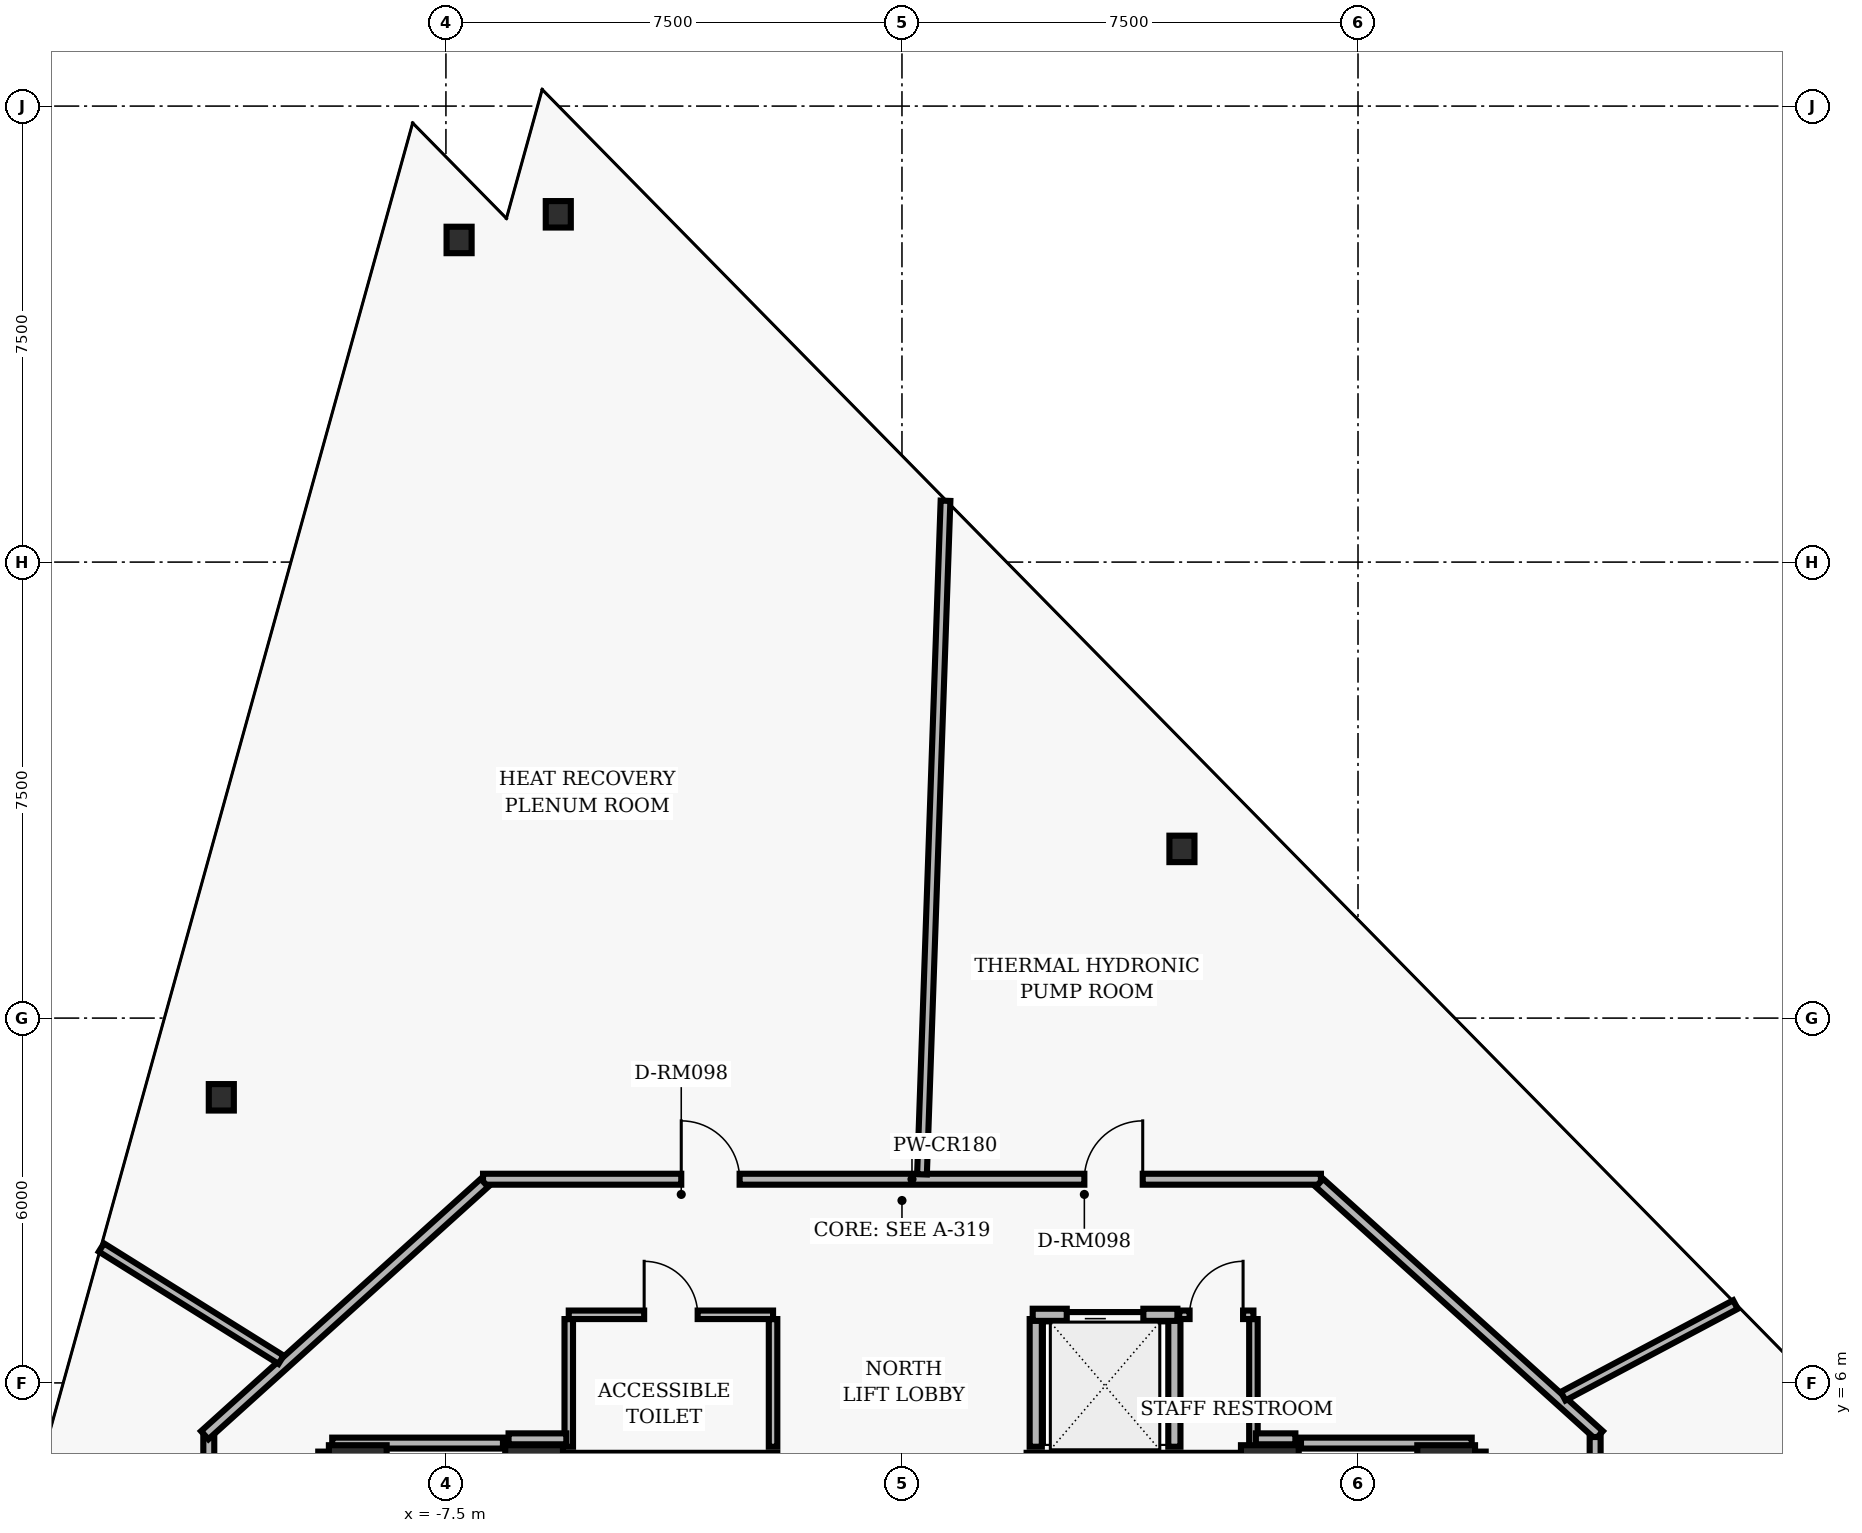
"""IFC4 building model, lengths in metres.
Left out: names, types, materials, properties, quantities, classifications, styles, units other than length and angle.
Written with IfcOpenShell. Run it as: python <this file> out.ifc"""

import sys

from ifc_helpers import new_model, si_unit, direction, frame, frame_2d, origin, origin_2d, place, context, subcontext, project, spatial, rectangle, hollow_rectangle, i_section, extrude, element, fill, save


model = new_model("IFC4")
c1 = context("Model", 3, precision=1e-05, world=origin(), true_north=direction((0.0, 1.0)))
c2 = subcontext(c1, "Body", "Model", "MODEL_VIEW")
j1 = project(units=[si_unit("LENGTHUNIT", "METRE"), si_unit("PLANEANGLEUNIT", "RADIAN")], contexts=[c1])
p1 = place(None, origin())
s1 = spatial("IfcSite", under=j1, at=p1, CompositionType="ELEMENT")
p2 = place(p1, origin())
s2 = spatial("IfcBuilding", under=s1, at=p2, CompositionType="ELEMENT")
p3 = place(p2, frame((0.0, 0.0, 100.8)))
s3 = spatial("IfcBuildingStorey", under=s2, at=p3, CompositionType="ELEMENT", Elevation=100.8)
for number, where, z_axis, x_axis in (
    (1, (-6.05, 4.5, 0.0), (0.0, 0.0, 1.0), (1.0, 0.0, 0.0)),
    (2, (6.05, 4.5, 0.0), (0.0, 0.0, 1.0), (1.0, 0.0, 0.0)),
    (3, (-8.95, 4.5, 0.0), (0.0, 0.0, 1.0), (1.0, 0.0, 0.0)),
    (4, (8.95, 4.5, 0.0), (0.0, 0.0, 1.0), (1.0, 0.0, 0.0)),
):
    element("IfcColumn", number, at=place(p3, frame(where, z_axis=z_axis, x_axis=x_axis)), inside=s3, PredefinedType="COLUMN", context=c2, shape_type="SweptSolid", body=[
        extrude(hollow_rectangle(XDim=0.95, YDim=0.95, WallThickness=0.06, InnerFilletRadius=0.02, OuterFilletRadius=0.04, at=origin_2d()), origin(), (0.0, 0.0, 1.0), 3.84),
    ])
for number, where, z_axis, x_axis in (
    (5, (-5.575, 4.5, 0.0), (0.0, 0.0, 1.0), (1.0, 0.0, 0.0)),
    (6, (2.05, 4.5, 0.0), (0.0, 0.0, 1.0), (1.0, 0.0, 0.0)),
):
    element("IfcWall", number, at=place(p3, frame(where, z_axis=z_axis, x_axis=x_axis)), inside=s3, PredefinedType="SHEAR", context=c2, shape_type="SweptSolid", body=[
        extrude(rectangle(XDim=3.525, YDim=0.7, at=frame_2d((1.762, 0.0))), origin(), (0.0, 0.0, 1.0), 3.418),
    ])
for number, where, z_axis, x_axis in (
    (7, (4.604, 14.783, 0.0), (0.0, 0.0, 1.0), (1.0, 0.0, 0.0)),
    (8, (-5.652, 25.22, 0.0), (0.0, 0.0, 1.0), (1.0, 0.0, 0.0)),
    (9, (-7.283, 24.798, 0.0), (0.0, 0.0, 1.0), (1.0, 0.0, 0.0)),
    (10, (-11.194, 10.697, 0.0), (0.0, 0.0, 1.0), (1.0, 0.0, 0.0)),
):
    element("IfcColumn", number, at=place(p3, frame(where, z_axis=z_axis, x_axis=x_axis)), inside=s3, PredefinedType="COLUMN", context=c2, shape_type="SweptSolid", body=[
        extrude(i_section(OverallWidth=0.412, OverallDepth=0.435, WebThickness=0.036, FlangeThickness=0.057, FilletRadius=0.022, at=origin_2d()), origin(), (0.0, 0.0, 1.0), 3.84),
    ])
for number, where, z_axis, x_axis in (
    (11, (2.2, 4.95, 0.0), (0.0, 0.0, 1.0), (0.0, 1.0, 0.0)),
    (12, (4.48, 4.95, 0.0), (0.0, 0.0, 1.0), (0.0, 1.0, 0.0)),
):
    element("IfcWall", number, at=place(p3, frame(where, z_axis=z_axis, x_axis=x_axis)), inside=s3, PredefinedType="PARTITIONING", context=c2, shape_type="SweptSolid", body=[
        extrude(rectangle(XDim=2.1, YDim=0.2, at=frame_2d((1.05, 0.0))), origin(), (0.0, 0.0, 1.0), 3.393),
    ])
p4 = place(p3, frame((2.15, 7.12, 0.0), z_axis=(0.0, 0.0, 1.0), x_axis=(1.0, 0.0, 0.0)))
e13 = element("IfcWall", 13, at=p4, inside=s3, PredefinedType="PARTITIONING", context=c2, shape_type="SweptSolid", body=[
    extrude(rectangle(XDim=2.38, YDim=0.2, at=frame_2d((1.19, 0.0))), origin(), (0.0, 0.0, 1.0), 3.393),
])
p5 = place(p4, frame((0.56, 0.0, 0.0)))
e14 = element("IfcOpeningElement", 14, at=p5, cuts=e13, PredefinedType="OPENING", context=c2, shape_type="SweptSolid", body=[
    extrude(rectangle(XDim=1.26, YDim=2.06, at=frame_2d((0.63, 1.03))), frame((0.0, 0.11, 0.0), z_axis=(0.0, -1.0, 0.0), x_axis=(1.0, 0.0, 0.0)), (0.0, 0.0, 1.0), 0.22),
])
for number, where, z_axis, x_axis in (
    (15, (-5.48, 4.95, 0.0), (0.0, 0.0, 1.0), (0.0, 1.0, 0.0)),
    (16, (-2.12, 4.95, 0.0), (0.0, 0.0, 1.0), (0.0, 1.0, 0.0)),
):
    element("IfcWall", number, at=place(p3, frame(where, z_axis=z_axis, x_axis=x_axis)), inside=s3, PredefinedType="PARTITIONING", context=c2, shape_type="SweptSolid", body=[
        extrude(rectangle(XDim=2.1, YDim=0.14, at=frame_2d((1.05, 0.0))), origin(), (0.0, 0.0, 1.0), 3.393),
    ])
p6 = place(p3, frame((-5.48, 7.12, 0.0), z_axis=(0.0, 0.0, 1.0), x_axis=(1.0, 0.0, 0.0)))
e17 = element("IfcWall", 17, at=p6, inside=s3, PredefinedType="PARTITIONING", context=c2, shape_type="SweptSolid", body=[
    extrude(rectangle(XDim=3.36, YDim=0.14, at=frame_2d((1.68, 0.0))), origin(), (0.0, 0.0, 1.0), 3.393),
])
p7 = place(p6, frame((1.24, 0.0, 0.0)))
e18 = element("IfcOpeningElement", 18, at=p7, cuts=e17, PredefinedType="OPENING", context=c2, shape_type="SweptSolid", body=[
    extrude(rectangle(XDim=0.88, YDim=2.02, at=frame_2d((0.44, 1.01))), frame((0.0, 0.08, 0.0), z_axis=(0.0, -1.0, 0.0), x_axis=(1.0, 0.0, 0.0)), (0.0, 0.0, 1.0), 0.16),
])
p8 = place(p3, frame((5.78, 4.95, 0.0), z_axis=(0.0, 0.0, 1.0), x_axis=(0.0, 1.0, 0.0)))
e19 = element("IfcWall", 19, at=p8, inside=s3, PredefinedType="PARTITIONING", context=c2, shape_type="SweptSolid", body=[
    extrude(rectangle(XDim=2.1, YDim=0.14, at=frame_2d((1.05, 0.0))), origin(), (0.0, 0.0, 1.0), 3.393),
])
p9 = place(p3, frame((4.56, 7.12, 0.0), z_axis=(0.0, 0.0, 1.0), x_axis=(1.0, 0.0, 0.0)))
e20 = element("IfcWall", 20, at=p9, inside=s3, PredefinedType="PARTITIONING", context=c2, shape_type="SweptSolid", body=[
    extrude(rectangle(XDim=1.22, YDim=0.14, at=frame_2d((0.61, 0.0))), origin(), (0.0, 0.0, 1.0), 3.393),
])
p10 = place(p9, frame((0.17, 0.0, 0.0)))
e21 = element("IfcOpeningElement", 21, at=p10, cuts=e20, PredefinedType="OPENING", context=c2, shape_type="SweptSolid", body=[
    extrude(rectangle(XDim=0.88, YDim=2.02, at=frame_2d((0.44, 1.01))), frame((0.0, 0.08, 0.0), z_axis=(0.0, -1.0, 0.0), x_axis=(1.0, 0.0, 0.0)), (0.0, 0.0, 1.0), 0.16),
])
p11 = place(p3, frame((-6.89, 9.35, 0.0), z_axis=(0.0, 0.0, 1.0), x_axis=(1.0, 0.0, 0.0)))
e22 = element("IfcWall", 22, at=p11, inside=s3, PredefinedType="PARTITIONING", context=c2, shape_type="SweptSolid", body=[
    extrude(rectangle(XDim=13.78, YDim=0.18, at=frame_2d((6.89, 0.0))), origin(), (0.0, 0.0, 1.0), 2.907),
])
p12 = place(p11, frame((9.889, 0.0, 0.0)))
e23 = element("IfcOpeningElement", 23, at=p12, cuts=e22, PredefinedType="OPENING", context=c2, shape_type="SweptSolid", body=[
    extrude(rectangle(XDim=0.96, YDim=2.02, at=frame_2d((0.48, 1.01))), frame((0.0, 0.1, 0.0), z_axis=(0.0, -1.0, 0.0), x_axis=(1.0, 0.0, 0.0)), (0.0, 0.0, 1.0), 0.2),
])
p13 = place(p11, frame((3.26, 0.0, 0.0)))
e24 = element("IfcOpeningElement", 24, at=p13, cuts=e22, PredefinedType="OPENING", context=c2, shape_type="SweptSolid", body=[
    extrude(rectangle(XDim=0.96, YDim=2.02, at=frame_2d((0.48, 1.01))), frame((0.0, 0.1, 0.0), z_axis=(0.0, -1.0, 0.0), x_axis=(1.0, 0.0, 0.0)), (0.0, 0.0, 1.0), 0.2),
])
p14 = place(p3, frame((6.867, 9.29, 0.0), z_axis=(0.0, 0.0, 1.0), x_axis=(0.742486327971, -0.669861219042, 0.0)))
e25 = element("IfcWall", 25, at=p14, inside=s3, PredefinedType="PARTITIONING", context=c2, shape_type="SweptSolid", body=[
    extrude(rectangle(XDim=6.196, YDim=0.18, at=frame_2d((3.098, 0.0))), origin(), (0.0, 0.0, 1.0), 2.907),
])
p15 = place(p3, frame((11.4, 5.11, 0.0), z_axis=(0.0, 0.0, 1.0), x_axis=(0.0, -1.0, 0.0)))
e26 = element("IfcWall", 26, at=p15, inside=s3, PredefinedType="PARTITIONING", context=c2, shape_type="SweptSolid", body=[
    extrude(rectangle(XDim=10.22, YDim=0.18, at=frame_2d((5.11, 0.0))), origin(), (0.0, 0.0, 1.0), 2.907),
])
p16 = place(p15, frame((4.63, 0.0, 0.0)))
e27 = element("IfcOpeningElement", 27, at=p16, cuts=e26, PredefinedType="OPENING", context=c2, shape_type="SweptSolid", body=[
    extrude(rectangle(XDim=0.96, YDim=2.02, at=frame_2d((0.48, 1.01))), frame((0.0, 0.1, 0.0), z_axis=(0.0, -1.0, 0.0), x_axis=(1.0, 0.0, 0.0)), (0.0, 0.0, 1.0), 0.2),
])
p17 = place(p3, frame((-11.4, -5.11, 0.0), z_axis=(0.0, 0.0, 1.0), x_axis=(0.0, 1.0, 0.0)))
e28 = element("IfcWall", 28, at=p17, inside=s3, PredefinedType="PARTITIONING", context=c2, shape_type="SweptSolid", body=[
    extrude(rectangle(XDim=10.22, YDim=0.18, at=frame_2d((5.11, 0.0))), origin(), (0.0, 0.0, 1.0), 2.907),
])
p18 = place(p17, frame((4.63, 0.0, 0.0)))
e29 = element("IfcOpeningElement", 29, at=p18, cuts=e28, PredefinedType="OPENING", context=c2, shape_type="SweptSolid", body=[
    extrude(rectangle(XDim=0.96, YDim=2.02, at=frame_2d((0.48, 1.01))), frame((0.0, 0.1, 0.0), z_axis=(0.0, -1.0, 0.0), x_axis=(1.0, 0.0, 0.0)), (0.0, 0.0, 1.0), 0.2),
])
p19 = place(p3, frame((-11.467, 5.14, 0.0), z_axis=(0.0, 0.0, 1.0), x_axis=(0.742486327971, 0.669861219042, 0.0)))
e30 = element("IfcWall", 30, at=p19, inside=s3, PredefinedType="PARTITIONING", context=c2, shape_type="SweptSolid", body=[
    extrude(rectangle(XDim=6.196, YDim=0.18, at=frame_2d((3.098, 0.0))), origin(), (0.0, 0.0, 1.0), 3.393),
])
p20 = place(p3, frame((-9.51, 4.87, 0.0), z_axis=(0.0, 0.0, 1.0), x_axis=(0.0, -1.0, 0.0)))
e31 = element("IfcWall", 31, at=p20, inside=s3, PredefinedType="PARTITIONING", context=c2, shape_type="SweptSolid", body=[
    extrude(rectangle(XDim=9.74, YDim=0.18, at=frame_2d((4.87, 0.0))), origin(), (0.0, 0.0, 1.0), 2.907),
])
p21 = place(p3, frame((9.51, -4.87, 0.0), z_axis=(0.0, 0.0, 1.0), x_axis=(0.0, 1.0, 0.0)))
e32 = element("IfcWall", 32, at=p21, inside=s3, PredefinedType="PARTITIONING", context=c2, shape_type="SweptSolid", body=[
    extrude(rectangle(XDim=9.74, YDim=0.18, at=frame_2d((4.87, 0.0))), origin(), (0.0, 0.0, 1.0), 2.6),
])
p22 = place(p3, frame((9.37, 5.01, 0.0), z_axis=(0.0, 0.0, 1.0), x_axis=(-1.0, 0.0, 0.0)))
e33 = element("IfcWall", 33, at=p22, inside=s3, PredefinedType="PARTITIONING", context=c2, shape_type="SweptSolid", body=[
    extrude(rectangle(XDim=2.808, YDim=0.18, at=frame_2d((1.404, 0.0))), origin(), (0.0, 0.0, 1.0), 3.393),
])
p23 = place(p3, frame((6.47, 5.08, 0.0), z_axis=(0.0, 0.0, 1.0), x_axis=(-1.0, 0.0, 0.0)))
e34 = element("IfcWall", 34, at=p23, inside=s3, PredefinedType="PARTITIONING", context=c2, shape_type="SweptSolid", body=[
    extrude(rectangle(XDim=0.65, YDim=0.18, at=frame_2d((0.325, 0.0))), origin(), (0.0, 0.0, 1.0), 3.393),
])
p24 = place(p3, frame((-5.52, 5.08, 0.0), z_axis=(0.0, 0.0, 1.0), x_axis=(-1.0, 0.0, 0.0)))
e35 = element("IfcWall", 35, at=p24, inside=s3, PredefinedType="PARTITIONING", context=c2, shape_type="SweptSolid", body=[
    extrude(rectangle(XDim=0.95, YDim=0.18, at=frame_2d((0.475, 0.0))), origin(), (0.0, 0.0, 1.0), 3.393),
])
p25 = place(p3, frame((-6.562, 5.01, 0.0), z_axis=(0.0, 0.0, 1.0), x_axis=(-1.0, 0.0, 0.0)))
e36 = element("IfcWall", 36, at=p25, inside=s3, PredefinedType="PARTITIONING", context=c2, shape_type="SweptSolid", body=[
    extrude(rectangle(XDim=2.808, YDim=0.18, at=frame_2d((1.404, 0.0))), origin(), (0.0, 0.0, 1.0), 3.393),
])
p26 = place(p3, frame((10.874, 5.782, 0.0), z_axis=(0.0, 0.0, 1.0), x_axis=(0.882948212964, 0.469470396536, 0.0)))
e37 = element("IfcWall", 37, at=p26, inside=s3, PredefinedType="PARTITIONING", context=c2, shape_type="SweptSolid", body=[
    extrude(rectangle(XDim=3.209, YDim=0.16, at=frame_2d((1.604, 0.0))), origin(), (0.0, 0.0, 1.0), 3.393),
])
p27 = place(p3, frame((0.329, 9.43, 0.0), z_axis=(0.0, 0.0, 1.0), x_axis=(0.03490676433, 0.999390573201, 0.0)))
e38 = element("IfcWall", 38, at=p27, inside=s3, PredefinedType="PARTITIONING", context=c2, shape_type="SweptSolid", body=[
    extrude(rectangle(XDim=11.086, YDim=0.16, at=frame_2d((5.543, 0.0))), origin(), (0.0, 0.0, 1.0), 3.393),
])
p28 = place(p3, frame((-10.211, 6.381, 0.0), z_axis=(0.0, 0.0, 1.0), x_axis=(-0.848061277386, 0.529898169272, 0.0)))
e39 = element("IfcWall", 39, at=p28, inside=s3, PredefinedType="PARTITIONING", context=c2, shape_type="SweptSolid", body=[
    extrude(rectangle(XDim=3.485, YDim=0.16, at=frame_2d((1.742, 0.0))), origin(), (0.0, 0.0, 1.0), 3.393),
])
p29 = place(p5, origin())
e40 = element("IfcDoor", 40, at=p29, inside=s3, OperationType="SLIDING_TO_LEFT", PredefinedType="DOOR", context=c2, shape_type="SweptSolid", body=[
    extrude(rectangle(XDim=1.26, YDim=2.06, at=frame_2d((0.63, 1.03))), frame((0.0, 0.025, 0.0), z_axis=(0.0, -1.0, 0.0), x_axis=(1.0, 0.0, 0.0)), (0.0, 0.0, 1.0), 0.05),
])
fill(e14, e40)
p30 = place(p7, origin())
e41 = element("IfcDoor", 41, at=p30, inside=s3, OperationType="SINGLE_SWING_LEFT", PredefinedType="DOOR", context=c2, shape_type="SweptSolid", body=[
    extrude(rectangle(XDim=0.88, YDim=2.02, at=frame_2d((0.44, 1.01))), frame((0.0, 0.025, 0.0), z_axis=(0.0, -1.0, 0.0), x_axis=(1.0, 0.0, 0.0)), (0.0, 0.0, 1.0), 0.05),
])
fill(e18, e41)
p31 = place(p10, origin())
e42 = element("IfcDoor", 42, at=p31, inside=s3, OperationType="SINGLE_SWING_RIGHT", PredefinedType="DOOR", context=c2, shape_type="SweptSolid", body=[
    extrude(rectangle(XDim=0.88, YDim=2.02, at=frame_2d((0.44, 1.01))), frame((0.0, 0.025, 0.0), z_axis=(0.0, -1.0, 0.0), x_axis=(1.0, 0.0, 0.0)), (0.0, 0.0, 1.0), 0.05),
])
fill(e21, e42)
p32 = place(p12, origin())
e43 = element("IfcDoor", 43, at=p32, inside=s3, OperationType="SINGLE_SWING_RIGHT", PredefinedType="DOOR", context=c2, shape_type="SweptSolid", body=[
    extrude(rectangle(XDim=0.96, YDim=2.02, at=frame_2d((0.48, 1.01))), frame((0.0, 0.025, 0.0), z_axis=(0.0, -1.0, 0.0), x_axis=(1.0, 0.0, 0.0)), (0.0, 0.0, 1.0), 0.05),
])
fill(e23, e43)
p33 = place(p13, origin())
e44 = element("IfcDoor", 44, at=p33, inside=s3, OperationType="SINGLE_SWING_LEFT", PredefinedType="DOOR", context=c2, shape_type="SweptSolid", body=[
    extrude(rectangle(XDim=0.96, YDim=2.02, at=frame_2d((0.48, 1.01))), frame((0.0, 0.025, 0.0), z_axis=(0.0, -1.0, 0.0), x_axis=(1.0, 0.0, 0.0)), (0.0, 0.0, 1.0), 0.05),
])
fill(e24, e44)
save(model, sys.argv[1])
